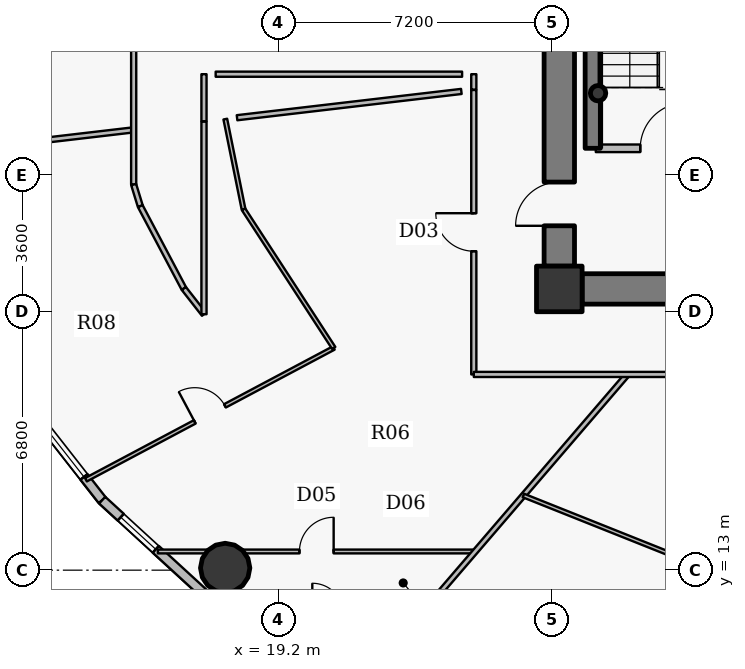
"""IFC4 building model, lengths in metres.
Left out: names, types, materials, properties, quantities, classifications, styles, units other than length and angle.
Written with IfcOpenShell. Run it as: python <this file> out.ifc"""

import sys

from ifc_helpers import new_model, si_unit, direction, frame, frame_2d, origin, origin_2d, place, context, subcontext, project, spatial, rectangle, hollow_circle, extrude, source, transform, mapped, element, fill, save


model = new_model("IFC4")
c1 = context("Model", 3, precision=1e-05, world=origin(), true_north=direction((0.0, 1.0)))
c2 = subcontext(c1, "Body", "Model", "MODEL_VIEW")
j1 = project(units=[si_unit("LENGTHUNIT", "METRE"), si_unit("PLANEANGLEUNIT", "RADIAN")], contexts=[c1])
p1 = place(None, origin())
s1 = spatial("IfcSite", under=j1, at=p1, CompositionType="ELEMENT")
p2 = place(p1, origin())
s2 = spatial("IfcBuilding", under=s1, at=p2, CompositionType="ELEMENT")
p3 = place(p2, frame((0.0, 0.0, 178.65)))
s3 = spatial("IfcBuildingStorey", under=s2, at=p3, CompositionType="ELEMENT", Elevation=178.65)
p4 = place(p3, frame((26.6, 20.4, 0.0), z_axis=(0.0, 0.0, 1.0), x_axis=(1.0, 0.0, 0.0)))
e1 = element("IfcColumn", 1, at=p4, inside=s3, PredefinedType="COLUMN", context=c2, shape_type="SweptSolid", body=[
    extrude(rectangle(XDim=1.2, YDim=1.2, at=origin_2d()), origin(), (0.0, 0.0, 1.0), 3.75),
])
p5 = place(p3, frame((27.48, 24.1, 0.0), z_axis=(0.0, 0.0, 1.0), x_axis=(0.0, 1.0, 0.0)))
e2 = element("IfcWall", 2, at=p5, inside=s3, PredefinedType="SHEAR", context=c2, shape_type="SweptSolid", body=[
    extrude(rectangle(XDim=8.6, YDim=0.4, at=frame_2d((4.3, 0.0))), origin(), (0.0, 0.0, 1.0), 3.75),
])
p6 = place(p3, frame((27.62, 25.55, 0.0), z_axis=(0.0, 0.0, 1.0), x_axis=(1.0, 0.0, 0.0)))
e3 = element("IfcColumn", 3, at=p6, inside=s3, PredefinedType="COLUMN", context=c2, shape_type="SweptSolid", body=[
    extrude(hollow_circle(Radius=0.203, WallThickness=0.016, at=origin_2d()), origin(), (0.0, 0.0, 1.0), 3.75),
])
p7 = place(p3, frame((44.8, 20.4, 0.0), z_axis=(0.0, 0.0, 1.0), x_axis=(-1.0, 0.0, 0.0)))
e4 = element("IfcWall", 4, at=p7, inside=s3, PredefinedType="SHEAR", context=c2, shape_type="SweptSolid", body=[
    extrude(rectangle(XDim=17.6, YDim=0.8, at=frame_2d((8.8, 0.0))), origin(), (0.0, 0.0, 1.0), 2.95),
])
p8 = place(p7, frame((9.55, 0.0, 0.0)))
e5 = element("IfcOpeningElement", 5, at=p8, cuts=e4, PredefinedType="OPENING", context=c2, shape_type="SweptSolid", body=[
    extrude(rectangle(XDim=1.15, YDim=2.15, at=origin_2d()), frame((0.575, 0.41, 1.075), z_axis=(0.0, -1.0, 0.0), x_axis=(1.0, 0.0, 0.0)), (0.0, 0.0, 1.0), 0.82),
])
p9 = place(p3, frame((26.6, 21.0, 0.0), z_axis=(0.0, 0.0, 1.0), x_axis=(0.0, 1.0, 0.0)))
e6 = element("IfcWall", 6, at=p9, inside=s3, PredefinedType="SHEAR", context=c2, shape_type="SweptSolid", body=[
    extrude(rectangle(XDim=12.0, YDim=0.8, at=frame_2d((6.0, 0.0))), origin(), (0.0, 0.0, 1.0), 2.95),
])
p10 = place(p9, frame((1.061, 0.0, 0.0)))
e7 = element("IfcOpeningElement", 7, at=p10, cuts=e6, PredefinedType="OPENING", context=c2, shape_type="SweptSolid", body=[
    extrude(rectangle(XDim=1.15, YDim=2.15, at=origin_2d()), frame((0.575, 0.41, 1.075), z_axis=(0.0, -1.0, 0.0), x_axis=(1.0, 0.0, 0.0)), (0.0, 0.0, 1.0), 0.82),
])
p11 = place(p3, frame((17.808, 13.058, 0.0), z_axis=(0.0, 0.0, 1.0), x_axis=(1.0, 0.0, 0.0)))
e8 = element("IfcColumn", 8, at=p11, inside=s3, PredefinedType="COLUMN", context=c2, shape_type="SweptSolid", body=[
    extrude(hollow_circle(Radius=0.65, WallThickness=0.04, at=origin_2d()), origin(), (0.0, 0.0, 1.0), 3.75),
])
p12 = place(p3, frame((14.572, 14.842, 0.0), z_axis=(0.0, 0.0, 1.0), x_axis=(-0.616287674549, 0.787521112224, 0.0)))
e9 = element("IfcWall", 9, at=p12, inside=s3, PredefinedType="SOLIDWALL", context=c2, shape_type="SweptSolid", body=[
    extrude(rectangle(XDim=3.517, YDim=0.24, at=frame_2d((1.759, 0.0))), origin(), (0.0, 0.0, 1.0), 3.5),
])
p13 = place(p12, frame((0.779, 0.0, 0.9)))
e10 = element("IfcOpeningElement", 10, at=p13, cuts=e9, PredefinedType="OPENING", context=c2, shape_type="SweptSolid", body=[
    extrude(rectangle(XDim=2.0, YDim=1.75, at=origin_2d()), frame((1.0, 0.13, 0.875), z_axis=(0.0, -1.0, 0.0), x_axis=(1.0, 0.0, 0.0)), (0.0, 0.0, 1.0), 0.26),
])
p14 = place(p3, frame((17.268, 12.369, 0.0), z_axis=(0.0, 0.0, 1.0), x_axis=(-0.737076565834, 0.675809245349, 0.0)))
e11 = element("IfcWall", 11, at=p14, inside=s3, PredefinedType="SOLIDWALL", context=c2, shape_type="SweptSolid", body=[
    extrude(rectangle(XDim=3.658, YDim=0.24, at=frame_2d((1.829, 0.0))), origin(), (0.0, 0.0, 1.0), 3.5),
])
p15 = place(p14, frame((1.746, 0.0, 0.9)))
e12 = element("IfcOpeningElement", 12, at=p15, cuts=e11, PredefinedType="OPENING", context=c2, shape_type="SweptSolid", body=[
    extrude(rectangle(XDim=1.25, YDim=1.65, at=origin_2d()), frame((0.625, 0.13, 0.825), z_axis=(0.0, -1.0, 0.0), x_axis=(1.0, 0.0, 0.0)), (0.0, 0.0, 1.0), 0.26),
])
p16 = place(p3, frame((9.828, 23.933, 0.0), z_axis=(0.0, 0.0, 1.0), x_axis=(0.993205157511, 0.116376608877, 0.0)))
e13 = element("IfcWall", 13, at=p16, inside=s3, PredefinedType="PARTITIONING", context=c2, shape_type="SweptSolid", body=[
    extrude(rectangle(XDim=5.61, YDim=0.135, at=frame_2d((2.805, 0.0))), origin(), (0.0, 0.0, 1.0), 2.935),
])
p17 = place(p3, frame((14.145, 15.379, 0.0), z_axis=(0.0, 0.0, 1.0), x_axis=(0.882946160832, 0.469474256027, 0.0)))
e14 = element("IfcWall", 14, at=p17, inside=s3, PredefinedType="PARTITIONING", context=c2, shape_type="SweptSolid", body=[
    extrude(rectangle(XDim=7.385, YDim=0.1, at=frame_2d((3.692, 0.0))), origin(), (0.0, 0.0, 1.0), 2.935),
])
p18 = place(p17, frame((3.242, 0.0, 0.0)))
e15 = element("IfcOpeningElement", 15, at=p18, cuts=e14, PredefinedType="OPENING", context=c2, shape_type="SweptSolid", body=[
    extrude(rectangle(XDim=0.9, YDim=2.1, at=origin_2d()), frame((0.45, 0.06, 1.05), z_axis=(0.0, -1.0, 0.0), x_axis=(1.0, 0.0, 0.0)), (0.0, 0.0, 1.0), 0.12),
])
p19 = place(p3, frame((15.4, 23.146, 0.0), z_axis=(0.0, 0.0, 1.0), x_axis=(0.0, 1.0, 0.0)))
e16 = element("IfcWall", 16, at=p19, inside=s3, PredefinedType="PARTITIONING", context=c2, shape_type="SweptSolid", body=[
    extrude(rectangle(XDim=4.804, YDim=0.135, at=frame_2d((2.402, 0.0))), origin(), (0.0, 0.0, 1.0), 2.935),
])
p20 = place(p3, frame((15.4, 23.146, 0.0), z_axis=(0.0, 0.0, 1.0), x_axis=(0.293335154151, -0.956009669061, 0.0)))
e17 = element("IfcWall", 17, at=p20, inside=s3, PredefinedType="PARTITIONING", context=c2, shape_type="SweptSolid", body=[
    extrude(rectangle(XDim=0.594, YDim=0.135, at=frame_2d((0.297, 0.0))), origin(), (0.0, 0.0, 1.0), 3.5),
])
p21 = place(p3, frame((15.574, 22.578, 0.0), z_axis=(0.0, 0.0, 1.0), x_axis=(0.46757196543, -0.883955008552, 0.0)))
e18 = element("IfcWall", 18, at=p21, inside=s3, PredefinedType="PARTITIONING", context=c2, shape_type="SweptSolid", body=[
    extrude(rectangle(XDim=2.451, YDim=0.135, at=frame_2d((1.226, 0.0))), origin(), (0.0, 0.0, 1.0), 2.935),
])
p22 = place(p3, frame((16.037, 13.491, 0.0), z_axis=(0.0, 0.0, 1.0), x_axis=(1.0, 0.0, 0.0)))
e19 = element("IfcWall", 19, at=p22, inside=s3, PredefinedType="PARTITIONING", context=c2, shape_type="SweptSolid", body=[
    extrude(rectangle(XDim=8.35, YDim=0.1, at=frame_2d((4.175, 0.0))), origin(), (0.0, 0.0, 1.0), 2.935),
])
p23 = place(p22, frame((3.725, 0.0, 0.0)))
e20 = element("IfcOpeningElement", 20, at=p23, cuts=e19, PredefinedType="OPENING", context=c2, shape_type="SweptSolid", body=[
    extrude(rectangle(XDim=0.9, YDim=2.1, at=origin_2d()), frame((0.45, 0.06, 1.05), z_axis=(0.0, -1.0, 0.0), x_axis=(1.0, 0.0, 0.0)), (0.0, 0.0, 1.0), 0.12),
])
p24 = place(p3, frame((16.72, 20.411, 0.0), z_axis=(0.0, 0.0, 1.0), x_axis=(0.616377221056, -0.787451027914, 0.0)))
e21 = element("IfcWall", 21, at=p24, inside=s3, PredefinedType="PARTITIONING", context=c2, shape_type="SweptSolid", body=[
    extrude(rectangle(XDim=0.859, YDim=0.135, at=frame_2d((0.43, 0.0))), origin(), (0.0, 0.0, 1.0), 3.5),
])
p25 = place(p3, frame((17.25, 19.734, 0.0), z_axis=(0.0, 0.0, 1.0), x_axis=(0.0, 1.0, 0.0)))
e22 = element("IfcWall", 22, at=p25, inside=s3, PredefinedType="PARTITIONING", context=c2, shape_type="SweptSolid", body=[
    extrude(rectangle(XDim=5.068, YDim=0.135, at=frame_2d((2.534, 0.0))), origin(), (0.0, 0.0, 1.0), 2.935),
])
p26 = place(p3, frame((17.811, 24.868, 0.0), z_axis=(0.0, 0.0, 1.0), x_axis=(0.198247700743, -0.980151952072, 0.0)))
e23 = element("IfcWall", 23, at=p26, inside=s3, PredefinedType="PARTITIONING", context=c2, shape_type="SweptSolid", body=[
    extrude(rectangle(XDim=2.422, YDim=0.1, at=frame_2d((1.211, 0.0))), origin(), (0.0, 0.0, 1.0), 2.935),
])
p27 = place(p3, frame((18.291, 22.494, 0.0), z_axis=(0.0, 0.0, 1.0), x_axis=(0.545410225271, -0.838169246734, 0.0)))
e24 = element("IfcWall", 24, at=p27, inside=s3, PredefinedType="PARTITIONING", context=c2, shape_type="SweptSolid", body=[
    extrude(rectangle(XDim=4.352, YDim=0.1, at=frame_2d((2.176, 0.0))), origin(), (0.0, 0.0, 1.0), 2.935),
])
p28 = place(p3, frame((21.259, 9.852, 0.0), z_axis=(0.0, 0.0, 1.0), x_axis=(0.651889454341, 0.758314011026, 0.0)))
e25 = element("IfcWall", 25, at=p28, inside=s3, PredefinedType="PARTITIONING", context=c2, shape_type="SweptSolid", body=[
    extrude(rectangle(XDim=10.942, YDim=0.135, at=frame_2d((5.471, 0.0))), origin(), (0.0, 0.0, 1.0), 2.935),
])
p29 = place(p3, frame((24.35, 18.15, 0.0), z_axis=(0.0, 0.0, 1.0), x_axis=(0.0, 1.0, 0.0)))
e26 = element("IfcWall", 26, at=p29, inside=s3, PredefinedType="PARTITIONING", context=c2, shape_type="SweptSolid", body=[
    extrude(rectangle(XDim=7.485, YDim=0.135, at=frame_2d((3.742, 0.0))), origin(), (0.0, 0.0, 1.0), 2.935),
])
p30 = place(p29, frame((3.242, 0.0, 0.0)))
e27 = element("IfcOpeningElement", 27, at=p30, cuts=e26, PredefinedType="OPENING", context=c2, shape_type="SweptSolid", body=[
    extrude(rectangle(XDim=1.0, YDim=2.15, at=origin_2d()), frame((0.5, 0.078, 1.075), z_axis=(0.0, -1.0, 0.0), x_axis=(1.0, 0.0, 0.0)), (0.0, 0.0, 1.0), 0.155),
])
p31 = place(p3, frame((24.35, 18.15, 0.0), z_axis=(0.0, 0.0, 1.0), x_axis=(1.0, 0.0, 0.0)))
e28 = element("IfcWall", 28, at=p31, inside=s3, PredefinedType="PARTITIONING", context=c2, shape_type="SweptSolid", body=[
    extrude(rectangle(XDim=11.341, YDim=0.135, at=frame_2d((5.67, 0.0))), origin(), (0.0, 0.0, 1.0), 2.935),
])
p32 = place(p31, frame((7.171, 0.0, 0.0)))
e29 = element("IfcOpeningElement", 29, at=p32, cuts=e28, PredefinedType="OPENING", context=c2, shape_type="SweptSolid", body=[
    extrude(rectangle(XDim=1.0, YDim=2.15, at=origin_2d()), frame((0.5, 0.078, 1.075), z_axis=(0.0, -1.0, 0.0), x_axis=(1.0, 0.0, 0.0)), (0.0, 0.0, 1.0), 0.155),
])
p33 = place(p3, frame((25.654, 14.965, 0.0), z_axis=(0.0, 0.0, 1.0), x_axis=(0.928793067963, -0.370598754589, 0.0)))
e30 = element("IfcWall", 30, at=p33, inside=s3, PredefinedType="PARTITIONING", context=c2, shape_type="SweptSolid", body=[
    extrude(rectangle(XDim=4.944, YDim=0.1, at=frame_2d((2.472, 0.0))), origin(), (0.0, 0.0, 1.0), 2.935),
])
p34 = place(p3, frame((27.56, 24.1, 0.0), z_axis=(0.0, 0.0, 1.0), x_axis=(1.0, 0.0, 0.0)))
e31 = element("IfcWall", 31, at=p34, inside=s3, PredefinedType="PARTITIONING", context=c2, shape_type="SweptSolid", body=[
    extrude(rectangle(XDim=3.54, YDim=0.2, at=frame_2d((1.77, 0.0))), origin(), (0.0, 0.0, 1.0), 3.5),
])
p35 = place(p34, frame((1.17, 0.0, 0.0)))
e32 = element("IfcOpeningElement", 32, at=p35, cuts=e31, PredefinedType="OPENING", context=c2, shape_type="SweptSolid", body=[
    extrude(rectangle(XDim=1.2, YDim=2.15, at=origin_2d()), frame((0.6, 0.11, 1.075), z_axis=(0.0, -1.0, 0.0), x_axis=(1.0, 0.0, 0.0)), (0.0, 0.0, 1.0), 0.22),
])
p36 = place(p3, frame((28.271, 7.219, 0.0), z_axis=(0.0, 0.0, 1.0), x_axis=(0.363936593544, 0.931423725207, 0.0)))
e33 = element("IfcWall", 33, at=p36, inside=s3, PredefinedType="PARTITIONING", context=c2, shape_type="SweptSolid", body=[
    extrude(rectangle(XDim=6.306, YDim=0.1, at=frame_2d((3.153, 0.0))), origin(), (0.0, 0.0, 1.0), 2.935),
])
p37 = place(p36, frame((2.703, 0.0, 0.0)))
e34 = element("IfcOpeningElement", 34, at=p37, cuts=e33, PredefinedType="OPENING", context=c2, shape_type="SweptSolid", body=[
    extrude(rectangle(XDim=0.9, YDim=2.1, at=origin_2d()), frame((0.45, 0.06, 1.05), z_axis=(0.0, -1.0, 0.0), x_axis=(1.0, 0.0, 0.0)), (0.0, 0.0, 1.0), 0.12),
])
p38 = place(p3, frame((17.25, 26.05, 0.0), z_axis=(0.0, 0.0, 1.0), x_axis=(0.0, -1.0, 0.0)))
e35 = element("IfcWall", 35, at=p38, inside=s3, PredefinedType="PARTITIONING", context=c2, shape_type="SweptSolid", body=[
    extrude(rectangle(XDim=1.238, YDim=0.135, at=frame_2d((0.619, 0.0))), origin(), (0.0, 0.0, 1.0), 3.035),
])
p39 = place(p3, frame((26.2, 20.99, 0.0), z_axis=(0.0, 0.0, 1.0), x_axis=(0.0, -1.0, 0.0)))
e36 = element("IfcWall", 36, at=p39, inside=s3, PredefinedType="PARTITIONING", context=c2, shape_type="SweptSolid", body=[
    extrude(rectangle(XDim=0.99, YDim=0.135, at=frame_2d((0.495, 0.0))), origin(), (0.0, 0.0, 1.0), 3.5),
])
p40 = place(p3, frame((26.508, 20.0, 0.0), z_axis=(0.0, 0.0, 1.0), x_axis=(1.0, 0.0, 0.0)))
e37 = element("IfcWall", 37, at=p40, inside=s3, PredefinedType="PARTITIONING", context=c2, shape_type="SweptSolid", body=[
    extrude(rectangle(XDim=0.682, YDim=0.135, at=frame_2d((0.341, 0.0))), origin(), (0.0, 0.0, 1.0), 2.935),
])
p41 = place(p3, frame((24.35, 25.645, 0.0), z_axis=(0.0, 0.0, 1.0), x_axis=(0.0, 1.0, 0.0)))
e38 = element("IfcWall", 38, at=p41, inside=s3, PredefinedType="PARTITIONING", context=c2, shape_type="SweptSolid", body=[
    extrude(rectangle(XDim=0.405, YDim=0.135, at=frame_2d((0.203, 0.0))), origin(), (0.0, 0.0, 1.0), 3.5),
])
p42 = place(p3, frame((24.042, 26.05, 0.0), z_axis=(0.0, 0.0, 1.0), x_axis=(-1.0, 0.0, 0.0)))
e39 = element("IfcWall", 39, at=p42, inside=s3, PredefinedType="PARTITIONING", context=c2, shape_type="SweptSolid", body=[
    extrude(rectangle(XDim=6.485, YDim=0.135, at=frame_2d((3.242, 0.0))), origin(), (0.0, 0.0, 1.0), 3.5),
])
p43 = place(p3, frame((18.12, 24.905, 0.0), z_axis=(0.0, 0.0, 1.0), x_axis=(0.993204061109, 0.116385965632, 0.0)))
e40 = element("IfcWall", 40, at=p43, inside=s3, PredefinedType="PARTITIONING", context=c2, shape_type="SweptSolid", body=[
    extrude(rectangle(XDim=5.943, YDim=0.135, at=frame_2d((2.971, 0.0))), origin(), (0.0, 0.0, 1.0), 3.5),
])
m1 = source(origin(), c2, "Body", "SweptSolid", [
    extrude(rectangle(XDim=2.0, YDim=1.75, at=origin_2d()), frame((1.0, 0.03, 0.875), z_axis=(0.0, -1.0, 0.0), x_axis=(1.0, 0.0, 0.0)), (0.0, 0.0, 1.0), 0.06),
])
p44 = place(p13, origin())
e41 = element("IfcWindow", 41, at=p44, inside=s3, PartitioningType="DOUBLE_PANEL_VERTICAL", PredefinedType="WINDOW", context=c2, shape_type="MappedRepresentation", body=[
    mapped(m1, transform((0.0, 0.0, 0.0), x_axis=(1.0, 0.0, 0.0), y_axis=(0.0, 1.0, 0.0), z_axis=(0.0, 0.0, 1.0), scale=1.0)),
])
fill(e10, e41)
m2 = source(origin(), c2, "Body", "SweptSolid", [
    extrude(rectangle(XDim=1.25, YDim=1.65, at=origin_2d()), frame((0.625, 0.03, 0.825), z_axis=(0.0, -1.0, 0.0), x_axis=(1.0, 0.0, 0.0)), (0.0, 0.0, 1.0), 0.06),
])
p45 = place(p15, origin())
e42 = element("IfcWindow", 42, at=p45, inside=s3, PartitioningType="SINGLE_PANEL", PredefinedType="WINDOW", context=c2, shape_type="MappedRepresentation", body=[
    mapped(m2, transform((0.0, 0.0, 0.0), x_axis=(1.0, 0.0, 0.0), y_axis=(0.0, 1.0, 0.0), z_axis=(0.0, 0.0, 1.0), scale=1.0)),
])
fill(e12, e42)
m3 = source(origin(), c2, "Body", "SweptSolid", [
    extrude(rectangle(XDim=1.15, YDim=2.15, at=origin_2d()), frame((0.575, 0.025, 1.075), z_axis=(0.0, -1.0, 0.0), x_axis=(1.0, 0.0, 0.0)), (0.0, 0.0, 1.0), 0.05),
])
p46 = place(p10, origin())
e43 = element("IfcDoor", 43, at=p46, inside=s3, OperationType="SINGLE_SWING_LEFT", PredefinedType="DOOR", context=c2, shape_type="MappedRepresentation", body=[
    mapped(m3, transform((0.0, 0.0, 0.0), x_axis=(1.0, 0.0, 0.0), y_axis=(0.0, 1.0, 0.0), z_axis=(0.0, 0.0, 1.0), scale=1.0)),
])
fill(e7, e43)
m4 = source(origin(), c2, "Body", "SweptSolid", [
    extrude(rectangle(XDim=1.2, YDim=2.15, at=origin_2d()), frame((0.6, 0.025, 1.075), z_axis=(0.0, -1.0, 0.0), x_axis=(1.0, 0.0, 0.0)), (0.0, 0.0, 1.0), 0.05),
])
p47 = place(p35, origin())
e44 = element("IfcDoor", 44, at=p47, inside=s3, OperationType="SINGLE_SWING_RIGHT", PredefinedType="DOOR", context=c2, shape_type="MappedRepresentation", body=[
    mapped(m4, transform((0.0, 0.0, 0.0), x_axis=(1.0, 0.0, 0.0), y_axis=(0.0, 1.0, 0.0), z_axis=(0.0, 0.0, 1.0), scale=1.0)),
])
fill(e32, e44)
m5 = source(origin(), c2, "Body", "SweptSolid", [
    extrude(rectangle(XDim=1.0, YDim=2.15, at=origin_2d()), frame((0.5, 0.025, 1.075), z_axis=(0.0, -1.0, 0.0), x_axis=(1.0, 0.0, 0.0)), (0.0, 0.0, 1.0), 0.05),
])
p48 = place(p30, origin())
e45 = element("IfcDoor", 45, at=p48, inside=s3, OperationType="SINGLE_SWING_RIGHT", PredefinedType="DOOR", context=c2, shape_type="MappedRepresentation", body=[
    mapped(m5, transform((0.0, 0.0, 0.0), x_axis=(1.0, 0.0, 0.0), y_axis=(0.0, 1.0, 0.0), z_axis=(0.0, 0.0, 1.0), scale=1.0)),
])
fill(e27, e45)
m6 = source(origin(), c2, "Body", "SweptSolid", [
    extrude(rectangle(XDim=0.9, YDim=2.1, at=origin_2d()), frame((0.45, 0.025, 1.05), z_axis=(0.0, -1.0, 0.0), x_axis=(1.0, 0.0, 0.0)), (0.0, 0.0, 1.0), 0.05),
])
p49 = place(p18, origin())
e46 = element("IfcDoor", 46, at=p49, inside=s3, OperationType="SINGLE_SWING_LEFT", PredefinedType="DOOR", context=c2, shape_type="MappedRepresentation", body=[
    mapped(m6, transform((0.0, 0.0, 0.0), x_axis=(1.0, 0.0, 0.0), y_axis=(0.0, 1.0, 0.0), z_axis=(0.0, 0.0, 1.0), scale=1.0)),
])
fill(e15, e46)
p50 = place(p23, origin())
e47 = element("IfcDoor", 47, at=p50, inside=s3, OperationType="SINGLE_SWING_RIGHT", PredefinedType="DOOR", context=c2, shape_type="MappedRepresentation", body=[
    mapped(m6, transform((0.0, 0.0, 0.0), x_axis=(1.0, 0.0, 0.0), y_axis=(0.0, 1.0, 0.0), z_axis=(0.0, 0.0, 1.0), scale=1.0)),
])
fill(e20, e47)
save(model, sys.argv[1])
